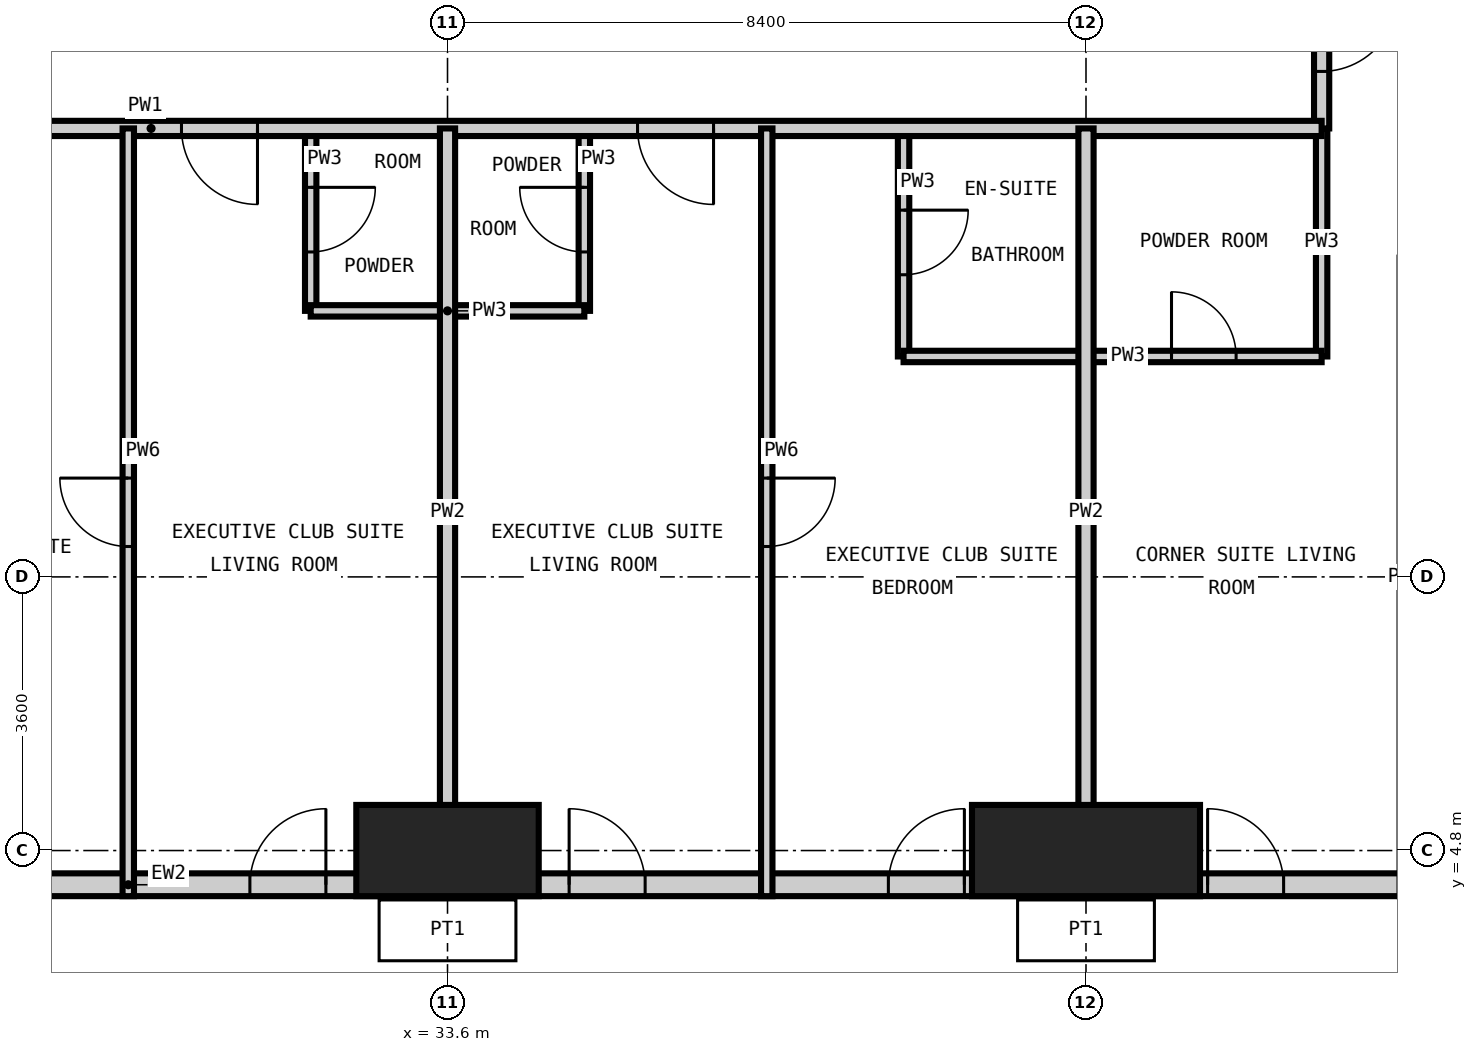
"""IFC4 building model, lengths in metres.
Left out: names, types, materials, properties, quantities, classifications, styles, units other than length and angle.
Written with IfcOpenShell. Run it as: python <this file> out.ifc"""

import sys

from ifc_helpers import new_model, si_unit, direction, frame, frame_2d, origin, origin_2d, place, context, subcontext, project, spatial, rectangle, extrude, element, fill, save


model = new_model("IFC4")
c1 = context("Model", 3, precision=1e-05, world=origin(), true_north=direction((0.0, 1.0)))
c2 = subcontext(c1, "Body", "Model", "MODEL_VIEW")
j1 = project(units=[si_unit("LENGTHUNIT", "METRE"), si_unit("PLANEANGLEUNIT", "RADIAN")], contexts=[c1])
p1 = place(None, origin())
s1 = spatial("IfcSite", under=j1, at=p1, CompositionType="ELEMENT")
p2 = place(p1, origin())
s2 = spatial("IfcBuilding", under=s1, at=p2, CompositionType="ELEMENT")
p3 = place(p2, frame((0.0, 0.0, 159.0)))
s3 = spatial("IfcBuildingStorey", under=s2, at=p3, CompositionType="ELEMENT", Elevation=159.0)
p4 = place(p3, frame((33.6, 4.8, -0.35), z_axis=(0.0, 0.0, 1.0), x_axis=(1.0, 0.0, 0.0)))
e1 = element("IfcColumn", 1, at=p4, inside=s3, PredefinedType="COLUMN", context=c2, shape_type="SweptSolid", body=[
    extrude(rectangle(XDim=2.4, YDim=1.2, at=origin_2d()), origin(), (0.0, 0.0, 1.0), 3.6),
])
p5 = place(p3, frame((42.0, 4.8, -0.35), z_axis=(0.0, 0.0, 1.0), x_axis=(1.0, 0.0, 0.0)))
e2 = element("IfcColumn", 2, at=p5, inside=s3, PredefinedType="COLUMN", context=c2, shape_type="SweptSolid", body=[
    extrude(rectangle(XDim=3.0, YDim=1.2, at=origin_2d()), origin(), (0.0, 0.0, 1.0), 3.6),
])
p6 = place(p3, frame((6.9, 4.35, 0.0), z_axis=(0.0, 0.0, 1.0), x_axis=(1.0, 0.0, 0.0)))
e3 = element("IfcWall", 3, at=p6, inside=s3, PredefinedType="SOLIDWALL", context=c2, shape_type="SweptSolid", body=[
    extrude(rectangle(XDim=45.0, YDim=0.3, at=frame_2d((22.5, 0.0))), origin(), (0.0, 0.0, 1.0), 3.25),
])
p7 = place(p6, frame((2.75, 0.0, 0.0)))
e4 = element("IfcOpeningElement", 4, at=p7, cuts=e3, PredefinedType="OPENING", context=c2, shape_type="SweptSolid", body=[
    extrude(rectangle(XDim=1.0, YDim=2.4, at=frame_2d((0.5, 1.2))), frame((0.0, 0.16, 0.0), z_axis=(0.0, -1.0, 0.0), x_axis=(1.0, 0.0, 0.0)), (0.0, 0.0, 1.0), 0.32),
])
p8 = place(p6, frame((7.3, 0.0, 0.0)))
e5 = element("IfcOpeningElement", 5, at=p8, cuts=e3, PredefinedType="OPENING", context=c2, shape_type="SweptSolid", body=[
    extrude(rectangle(XDim=1.0, YDim=2.4, at=frame_2d((0.5, 1.2))), frame((0.0, 0.16, 0.0), z_axis=(0.0, -1.0, 0.0), x_axis=(1.0, 0.0, 0.0)), (0.0, 0.0, 1.0), 0.32),
])
p9 = place(p6, frame((11.5, 0.0, 0.0)))
e6 = element("IfcOpeningElement", 6, at=p9, cuts=e3, PredefinedType="OPENING", context=c2, shape_type="SweptSolid", body=[
    extrude(rectangle(XDim=1.0, YDim=2.4, at=frame_2d((0.5, 1.2))), frame((0.0, 0.16, 0.0), z_axis=(0.0, -1.0, 0.0), x_axis=(1.0, 0.0, 0.0)), (0.0, 0.0, 1.0), 0.32),
])
p10 = place(p6, frame((15.7, 0.0, 0.0)))
e7 = element("IfcOpeningElement", 7, at=p10, cuts=e3, PredefinedType="OPENING", context=c2, shape_type="SweptSolid", body=[
    extrude(rectangle(XDim=1.0, YDim=2.4, at=frame_2d((0.5, 1.2))), frame((0.0, 0.16, 0.0), z_axis=(0.0, -1.0, 0.0), x_axis=(1.0, 0.0, 0.0)), (0.0, 0.0, 1.0), 0.32),
])
p11 = place(p6, frame((19.9, 0.0, 0.0)))
e8 = element("IfcOpeningElement", 8, at=p11, cuts=e3, PredefinedType="OPENING", context=c2, shape_type="SweptSolid", body=[
    extrude(rectangle(XDim=1.0, YDim=2.4, at=frame_2d((0.5, 1.2))), frame((0.0, 0.16, 0.0), z_axis=(0.0, -1.0, 0.0), x_axis=(1.0, 0.0, 0.0)), (0.0, 0.0, 1.0), 0.32),
])
p12 = place(p6, frame((24.1, 0.0, 0.0)))
e9 = element("IfcOpeningElement", 9, at=p12, cuts=e3, PredefinedType="OPENING", context=c2, shape_type="SweptSolid", body=[
    extrude(rectangle(XDim=1.0, YDim=2.4, at=frame_2d((0.5, 1.2))), frame((0.0, 0.16, 0.0), z_axis=(0.0, -1.0, 0.0), x_axis=(1.0, 0.0, 0.0)), (0.0, 0.0, 1.0), 0.32),
])
p13 = place(p6, frame((28.3, 0.0, 0.0)))
e10 = element("IfcOpeningElement", 10, at=p13, cuts=e3, PredefinedType="OPENING", context=c2, shape_type="SweptSolid", body=[
    extrude(rectangle(XDim=1.0, YDim=2.4, at=frame_2d((0.5, 1.2))), frame((0.0, 0.16, 0.0), z_axis=(0.0, -1.0, 0.0), x_axis=(1.0, 0.0, 0.0)), (0.0, 0.0, 1.0), 0.32),
])
p14 = place(p6, frame((32.5, 0.0, 0.0)))
e11 = element("IfcOpeningElement", 11, at=p14, cuts=e3, PredefinedType="OPENING", context=c2, shape_type="SweptSolid", body=[
    extrude(rectangle(XDim=1.0, YDim=2.4, at=frame_2d((0.5, 1.2))), frame((0.0, 0.16, 0.0), z_axis=(0.0, -1.0, 0.0), x_axis=(1.0, 0.0, 0.0)), (0.0, 0.0, 1.0), 0.32),
])
p15 = place(p6, frame((36.7, 0.0, 0.0)))
e12 = element("IfcOpeningElement", 12, at=p15, cuts=e3, PredefinedType="OPENING", context=c2, shape_type="SweptSolid", body=[
    extrude(rectangle(XDim=1.0, YDim=2.4, at=frame_2d((0.5, 1.2))), frame((0.0, 0.16, 0.0), z_axis=(0.0, -1.0, 0.0), x_axis=(1.0, 0.0, 0.0)), (0.0, 0.0, 1.0), 0.32),
])
p16 = place(p6, frame((41.25, 0.0, 0.0)))
e13 = element("IfcOpeningElement", 13, at=p16, cuts=e3, PredefinedType="OPENING", context=c2, shape_type="SweptSolid", body=[
    extrude(rectangle(XDim=1.0, YDim=2.4, at=frame_2d((0.5, 1.2))), frame((0.0, 0.16, 0.0), z_axis=(0.0, -1.0, 0.0), x_axis=(1.0, 0.0, 0.0)), (0.0, 0.0, 1.0), 0.32),
])
p17 = place(p3, frame((31.8, 11.9, 0.0), z_axis=(0.0, 0.0, 1.0), x_axis=(0.0, 1.0, 0.0)))
e14 = element("IfcWall", 14, at=p17, inside=s3, PredefinedType="PARTITIONING", context=c2, shape_type="SweptSolid", body=[
    extrude(rectangle(XDim=2.4, YDim=0.15, at=frame_2d((1.2, 0.0))), origin(), (0.0, 0.0, 1.0), 3.25),
])
p18 = place(p17, frame((0.775, 0.0, 0.0)))
e15 = element("IfcOpeningElement", 15, at=p18, cuts=e14, PredefinedType="OPENING", context=c2, shape_type="SweptSolid", body=[
    extrude(rectangle(XDim=0.85, YDim=2.1, at=frame_2d((0.425, 1.05))), frame((0.0, 0.085, 0.0), z_axis=(0.0, -1.0, 0.0), x_axis=(1.0, 0.0, 0.0)), (0.0, 0.0, 1.0), 0.17),
])
p19 = place(p3, frame((35.4, 11.9, 0.0), z_axis=(0.0, 0.0, 1.0), x_axis=(0.0, 1.0, 0.0)))
e16 = element("IfcWall", 16, at=p19, inside=s3, PredefinedType="PARTITIONING", context=c2, shape_type="SweptSolid", body=[
    extrude(rectangle(XDim=2.4, YDim=0.15, at=frame_2d((1.2, 0.0))), origin(), (0.0, 0.0, 1.0), 3.25),
])
p20 = place(p19, frame((0.775, 0.0, 0.0)))
e17 = element("IfcOpeningElement", 17, at=p20, cuts=e16, PredefinedType="OPENING", context=c2, shape_type="SweptSolid", body=[
    extrude(rectangle(XDim=0.85, YDim=2.1, at=frame_2d((0.425, 1.05))), frame((0.0, 0.085, 0.0), z_axis=(0.0, -1.0, 0.0), x_axis=(1.0, 0.0, 0.0)), (0.0, 0.0, 1.0), 0.17),
])
p21 = place(p3, frame((39.6, 11.3, 0.0), z_axis=(0.0, 0.0, 1.0), x_axis=(0.0, 1.0, 0.0)))
e18 = element("IfcWall", 18, at=p21, inside=s3, PredefinedType="PARTITIONING", context=c2, shape_type="SweptSolid", body=[
    extrude(rectangle(XDim=3.0, YDim=0.15, at=frame_2d((1.5, 0.0))), origin(), (0.0, 0.0, 1.0), 3.25),
])
p22 = place(p21, frame((1.075, 0.0, 0.0)))
e19 = element("IfcOpeningElement", 19, at=p22, cuts=e18, PredefinedType="OPENING", context=c2, shape_type="SweptSolid", body=[
    extrude(rectangle(XDim=0.85, YDim=2.1, at=frame_2d((0.425, 1.05))), frame((0.0, 0.085, 0.0), z_axis=(0.0, -1.0, 0.0), x_axis=(1.0, 0.0, 0.0)), (0.0, 0.0, 1.0), 0.17),
])
p23 = place(p3, frame((45.1, 11.3, 0.0), z_axis=(0.0, 0.0, 1.0), x_axis=(0.0, 1.0, 0.0)))
e20 = element("IfcWall", 20, at=p23, inside=s3, PredefinedType="PARTITIONING", context=c2, shape_type="SweptSolid", body=[
    extrude(rectangle(XDim=3.0, YDim=0.15, at=frame_2d((1.5, 0.0))), origin(), (0.0, 0.0, 1.0), 3.25),
])
p24 = place(p3, frame((39.6, 11.3, 0.0), z_axis=(0.0, 0.0, 1.0), x_axis=(1.0, 0.0, 0.0)))
e21 = element("IfcWall", 21, at=p24, inside=s3, PredefinedType="PARTITIONING", context=c2, shape_type="SweptSolid", body=[
    extrude(rectangle(XDim=5.5, YDim=0.15, at=frame_2d((2.75, 0.0))), origin(), (0.0, 0.0, 1.0), 3.25),
])
p25 = place(p24, frame((3.525, 0.0, 0.0)))
e22 = element("IfcOpeningElement", 22, at=p25, cuts=e21, PredefinedType="OPENING", context=c2, shape_type="SweptSolid", body=[
    extrude(rectangle(XDim=0.85, YDim=2.1, at=frame_2d((0.425, 1.05))), frame((0.0, 0.085, 0.0), z_axis=(0.0, -1.0, 0.0), x_axis=(1.0, 0.0, 0.0)), (0.0, 0.0, 1.0), 0.17),
])
p26 = place(p3, frame((31.8, 11.9, 0.0), z_axis=(0.0, 0.0, 1.0), x_axis=(1.0, 0.0, 0.0)))
e23 = element("IfcWall", 23, at=p26, inside=s3, PredefinedType="PARTITIONING", context=c2, shape_type="SweptSolid", body=[
    extrude(rectangle(XDim=3.6, YDim=0.15, at=frame_2d((1.8, 0.0))), origin(), (0.0, 0.0, 1.0), 3.25),
])
p27 = place(p3, frame((45.1, 45.7, 0.0), z_axis=(0.0, 0.0, 1.0), x_axis=(0.0, -1.0, 0.0)))
e24 = element("IfcWall", 24, at=p27, inside=s3, PredefinedType="PARTITIONING", context=c2, shape_type="SweptSolid", body=[
    extrude(rectangle(XDim=31.4, YDim=0.2, at=frame_2d((15.7, 0.0))), origin(), (0.0, 0.0, 1.0), 3.25),
])
p28 = place(p27, frame((25.1, 0.0, 0.0)))
e25 = element("IfcOpeningElement", 25, at=p28, cuts=e24, PredefinedType="OPENING", context=c2, shape_type="SweptSolid", body=[
    extrude(rectangle(XDim=1.0, YDim=2.2, at=frame_2d((0.5, 1.1))), frame((0.0, 0.11, 0.0), z_axis=(0.0, -1.0, 0.0), x_axis=(1.0, 0.0, 0.0)), (0.0, 0.0, 1.0), 0.22),
])
p29 = place(p27, frame((23.3, 0.0, 0.0)))
e26 = element("IfcOpeningElement", 26, at=p29, cuts=e24, PredefinedType="OPENING", context=c2, shape_type="SweptSolid", body=[
    extrude(rectangle(XDim=1.0, YDim=2.2, at=frame_2d((0.5, 1.1))), frame((0.0, 0.11, 0.0), z_axis=(0.0, -1.0, 0.0), x_axis=(1.0, 0.0, 0.0)), (0.0, 0.0, 1.0), 0.22),
])
p30 = place(p27, frame((16.7, 0.0, 0.0)))
e27 = element("IfcOpeningElement", 27, at=p30, cuts=e24, PredefinedType="OPENING", context=c2, shape_type="SweptSolid", body=[
    extrude(rectangle(XDim=1.0, YDim=2.2, at=frame_2d((0.5, 1.1))), frame((0.0, 0.11, 0.0), z_axis=(0.0, -1.0, 0.0), x_axis=(1.0, 0.0, 0.0)), (0.0, 0.0, 1.0), 0.22),
])
p31 = place(p27, frame((14.9, 0.0, 0.0)))
e28 = element("IfcOpeningElement", 28, at=p31, cuts=e24, PredefinedType="OPENING", context=c2, shape_type="SweptSolid", body=[
    extrude(rectangle(XDim=1.0, YDim=2.2, at=frame_2d((0.5, 1.1))), frame((0.0, 0.11, 0.0), z_axis=(0.0, -1.0, 0.0), x_axis=(1.0, 0.0, 0.0)), (0.0, 0.0, 1.0), 0.22),
])
p32 = place(p27, frame((8.3, 0.0, 0.0)))
e29 = element("IfcOpeningElement", 29, at=p32, cuts=e24, PredefinedType="OPENING", context=c2, shape_type="SweptSolid", body=[
    extrude(rectangle(XDim=1.0, YDim=2.2, at=frame_2d((0.5, 1.1))), frame((0.0, 0.11, 0.0), z_axis=(0.0, -1.0, 0.0), x_axis=(1.0, 0.0, 0.0)), (0.0, 0.0, 1.0), 0.22),
])
p33 = place(p27, frame((6.5, 0.0, 0.0)))
e30 = element("IfcOpeningElement", 30, at=p33, cuts=e24, PredefinedType="OPENING", context=c2, shape_type="SweptSolid", body=[
    extrude(rectangle(XDim=1.0, YDim=2.2, at=frame_2d((0.5, 1.1))), frame((0.0, 0.11, 0.0), z_axis=(0.0, -1.0, 0.0), x_axis=(1.0, 0.0, 0.0)), (0.0, 0.0, 1.0), 0.22),
])
p34 = place(p27, frame((29.65, 0.0, 0.0)))
e31 = element("IfcOpeningElement", 31, at=p34, cuts=e24, PredefinedType="OPENING", context=c2, shape_type="SweptSolid", body=[
    extrude(rectangle(XDim=1.0, YDim=2.2, at=frame_2d((0.5, 1.1))), frame((0.0, 0.11, 0.0), z_axis=(0.0, -1.0, 0.0), x_axis=(1.0, 0.0, 0.0)), (0.0, 0.0, 1.0), 0.22),
])
p35 = place(p27, frame((1.35, 0.0, 0.0)))
e32 = element("IfcOpeningElement", 32, at=p35, cuts=e24, PredefinedType="OPENING", context=c2, shape_type="SweptSolid", body=[
    extrude(rectangle(XDim=1.0, YDim=2.2, at=frame_2d((0.5, 1.1))), frame((0.0, 0.11, 0.0), z_axis=(0.0, -1.0, 0.0), x_axis=(1.0, 0.0, 0.0)), (0.0, 0.0, 1.0), 0.22),
])
p36 = place(p3, frame((45.1, 14.3, 0.0), z_axis=(0.0, 0.0, 1.0), x_axis=(-1.0, 0.0, 0.0)))
e33 = element("IfcWall", 33, at=p36, inside=s3, PredefinedType="PARTITIONING", context=c2, shape_type="SweptSolid", body=[
    extrude(rectangle(XDim=30.8, YDim=0.2, at=frame_2d((15.4, 0.0))), origin(), (0.0, 0.0, 1.0), 3.25),
])
p37 = place(p36, frame((24.8, 0.0, 0.0)))
e34 = element("IfcOpeningElement", 34, at=p37, cuts=e33, PredefinedType="OPENING", context=c2, shape_type="SweptSolid", body=[
    extrude(rectangle(XDim=1.0, YDim=2.2, at=frame_2d((0.5, 1.1))), frame((0.0, 0.11, 0.0), z_axis=(0.0, -1.0, 0.0), x_axis=(1.0, 0.0, 0.0)), (0.0, 0.0, 1.0), 0.22),
])
p38 = place(p36, frame((14.0, 0.0, 0.0)))
e35 = element("IfcOpeningElement", 35, at=p38, cuts=e33, PredefinedType="OPENING", context=c2, shape_type="SweptSolid", body=[
    extrude(rectangle(XDim=1.0, YDim=2.2, at=frame_2d((0.5, 1.1))), frame((0.0, 0.11, 0.0), z_axis=(0.0, -1.0, 0.0), x_axis=(1.0, 0.0, 0.0)), (0.0, 0.0, 1.0), 0.22),
])
p39 = place(p36, frame((8.0, 0.0, 0.0)))
e36 = element("IfcOpeningElement", 36, at=p39, cuts=e33, PredefinedType="OPENING", context=c2, shape_type="SweptSolid", body=[
    extrude(rectangle(XDim=1.0, YDim=2.2, at=frame_2d((0.5, 1.1))), frame((0.0, 0.11, 0.0), z_axis=(0.0, -1.0, 0.0), x_axis=(1.0, 0.0, 0.0)), (0.0, 0.0, 1.0), 0.22),
])
for number, where, z_axis, x_axis in (
    (37, (33.6, 4.2, 0.0), (0.0, 0.0, 1.0), (0.0, 1.0, 0.0)),
    (38, (42.0, 4.2, 0.0), (0.0, 0.0, 1.0), (0.0, 1.0, 0.0)),
):
    element("IfcWall", number, at=place(p3, frame(where, z_axis=z_axis, x_axis=x_axis)), inside=s3, PredefinedType="PARTITIONING", context=c2, shape_type="SweptSolid", body=[
        extrude(rectangle(XDim=10.1, YDim=0.2, at=frame_2d((5.05, 0.0))), origin(), (0.0, 0.0, 1.0), 3.25),
    ])
p40 = place(p3, frame((29.4, 4.2, 0.0), z_axis=(0.0, 0.0, 1.0), x_axis=(0.0, 1.0, 0.0)))
e39 = element("IfcWall", 39, at=p40, inside=s3, PredefinedType="PARTITIONING", context=c2, shape_type="SweptSolid", body=[
    extrude(rectangle(XDim=10.1, YDim=0.15, at=frame_2d((5.05, 0.0))), origin(), (0.0, 0.0, 1.0), 3.25),
])
p41 = place(p40, frame((4.6, 0.0, 0.0)))
e40 = element("IfcOpeningElement", 40, at=p41, cuts=e39, PredefinedType="OPENING", context=c2, shape_type="SweptSolid", body=[
    extrude(rectangle(XDim=0.9, YDim=2.1, at=frame_2d((0.45, 1.05))), frame((0.0, 0.085, 0.0), z_axis=(0.0, -1.0, 0.0), x_axis=(1.0, 0.0, 0.0)), (0.0, 0.0, 1.0), 0.17),
])
p42 = place(p3, frame((37.8, 4.2, 0.0), z_axis=(0.0, 0.0, 1.0), x_axis=(0.0, 1.0, 0.0)))
e41 = element("IfcWall", 41, at=p42, inside=s3, PredefinedType="PARTITIONING", context=c2, shape_type="SweptSolid", body=[
    extrude(rectangle(XDim=10.1, YDim=0.15, at=frame_2d((5.05, 0.0))), origin(), (0.0, 0.0, 1.0), 3.25),
])
p43 = place(p42, frame((4.6, 0.0, 0.0)))
e42 = element("IfcOpeningElement", 42, at=p43, cuts=e41, PredefinedType="OPENING", context=c2, shape_type="SweptSolid", body=[
    extrude(rectangle(XDim=0.9, YDim=2.1, at=frame_2d((0.45, 1.05))), frame((0.0, 0.085, 0.0), z_axis=(0.0, -1.0, 0.0), x_axis=(1.0, 0.0, 0.0)), (0.0, 0.0, 1.0), 0.17),
])
p44 = place(p12, origin())
e43 = element("IfcDoor", 43, at=p44, inside=s3, OperationType="SINGLE_SWING_RIGHT", PredefinedType="DOOR", context=c2, shape_type="SweptSolid", body=[
    extrude(rectangle(XDim=1.0, YDim=2.4, at=frame_2d((0.5, 1.2))), frame((0.0, 0.025, 0.0), z_axis=(0.0, -1.0, 0.0), x_axis=(1.0, 0.0, 0.0)), (0.0, 0.0, 1.0), 0.05),
])
fill(e9, e43)
p45 = place(p13, origin())
e44 = element("IfcDoor", 44, at=p45, inside=s3, OperationType="SINGLE_SWING_LEFT", PredefinedType="DOOR", context=c2, shape_type="SweptSolid", body=[
    extrude(rectangle(XDim=1.0, YDim=2.4, at=frame_2d((0.5, 1.2))), frame((0.0, 0.025, 0.0), z_axis=(0.0, -1.0, 0.0), x_axis=(1.0, 0.0, 0.0)), (0.0, 0.0, 1.0), 0.05),
])
fill(e10, e44)
p46 = place(p14, origin())
e45 = element("IfcDoor", 45, at=p46, inside=s3, OperationType="SINGLE_SWING_RIGHT", PredefinedType="DOOR", context=c2, shape_type="SweptSolid", body=[
    extrude(rectangle(XDim=1.0, YDim=2.4, at=frame_2d((0.5, 1.2))), frame((0.0, 0.025, 0.0), z_axis=(0.0, -1.0, 0.0), x_axis=(1.0, 0.0, 0.0)), (0.0, 0.0, 1.0), 0.05),
])
fill(e11, e45)
p47 = place(p15, origin())
e46 = element("IfcDoor", 46, at=p47, inside=s3, OperationType="SINGLE_SWING_LEFT", PredefinedType="DOOR", context=c2, shape_type="SweptSolid", body=[
    extrude(rectangle(XDim=1.0, YDim=2.4, at=frame_2d((0.5, 1.2))), frame((0.0, 0.025, 0.0), z_axis=(0.0, -1.0, 0.0), x_axis=(1.0, 0.0, 0.0)), (0.0, 0.0, 1.0), 0.05),
])
fill(e12, e46)
p48 = place(p38, origin())
e47 = element("IfcDoor", 47, at=p48, inside=s3, OperationType="SINGLE_SWING_LEFT", PredefinedType="DOOR", context=c2, shape_type="SweptSolid", body=[
    extrude(rectangle(XDim=1.0, YDim=2.2, at=frame_2d((0.5, 1.1))), frame((0.0, 0.025, 0.0), z_axis=(0.0, -1.0, 0.0), x_axis=(1.0, 0.0, 0.0)), (0.0, 0.0, 1.0), 0.05),
])
fill(e35, e47)
p49 = place(p18, frame((0.85, 0.0, 0.0), z_axis=(0.0, 0.0, 1.0), x_axis=(-1.0, 0.0, 0.0)))
e48 = element("IfcDoor", 48, at=p49, inside=s3, OperationType="SINGLE_SWING_LEFT", PredefinedType="DOOR", context=c2, shape_type="SweptSolid", body=[
    extrude(rectangle(XDim=0.85, YDim=2.1, at=frame_2d((0.425, 1.05))), frame((0.0, 0.025, 0.0), z_axis=(0.0, -1.0, 0.0), x_axis=(1.0, 0.0, 0.0)), (0.0, 0.0, 1.0), 0.05),
])
fill(e15, e48)
p50 = place(p41, origin())
e49 = element("IfcDoor", 49, at=p50, inside=s3, OperationType="SINGLE_SWING_RIGHT", PredefinedType="DOOR", context=c2, shape_type="SweptSolid", body=[
    extrude(rectangle(XDim=0.9, YDim=2.1, at=frame_2d((0.45, 1.05))), frame((0.0, 0.025, 0.0), z_axis=(0.0, -1.0, 0.0), x_axis=(1.0, 0.0, 0.0)), (0.0, 0.0, 1.0), 0.05),
])
fill(e40, e49)
p51 = place(p39, origin())
e50 = element("IfcDoor", 50, at=p51, inside=s3, OperationType="SINGLE_SWING_LEFT", PredefinedType="DOOR", context=c2, shape_type="SweptSolid", body=[
    extrude(rectangle(XDim=1.0, YDim=2.2, at=frame_2d((0.5, 1.1))), frame((0.0, 0.025, 0.0), z_axis=(0.0, -1.0, 0.0), x_axis=(1.0, 0.0, 0.0)), (0.0, 0.0, 1.0), 0.05),
])
fill(e36, e50)
p52 = place(p20, origin())
e51 = element("IfcDoor", 51, at=p52, inside=s3, OperationType="SINGLE_SWING_RIGHT", PredefinedType="DOOR", context=c2, shape_type="SweptSolid", body=[
    extrude(rectangle(XDim=0.85, YDim=2.1, at=frame_2d((0.425, 1.05))), frame((0.0, 0.025, 0.0), z_axis=(0.0, -1.0, 0.0), x_axis=(1.0, 0.0, 0.0)), (0.0, 0.0, 1.0), 0.05),
])
fill(e17, e51)
p53 = place(p43, frame((0.9, 0.0, 0.0), z_axis=(0.0, 0.0, 1.0), x_axis=(-1.0, 0.0, 0.0)))
e52 = element("IfcDoor", 52, at=p53, inside=s3, OperationType="SINGLE_SWING_LEFT", PredefinedType="DOOR", context=c2, shape_type="SweptSolid", body=[
    extrude(rectangle(XDim=0.9, YDim=2.1, at=frame_2d((0.45, 1.05))), frame((0.0, 0.025, 0.0), z_axis=(0.0, -1.0, 0.0), x_axis=(1.0, 0.0, 0.0)), (0.0, 0.0, 1.0), 0.05),
])
fill(e42, e52)
p54 = place(p22, frame((0.85, 0.0, 0.0), z_axis=(0.0, 0.0, 1.0), x_axis=(-1.0, 0.0, 0.0)))
e53 = element("IfcDoor", 53, at=p54, inside=s3, OperationType="SINGLE_SWING_LEFT", PredefinedType="DOOR", context=c2, shape_type="SweptSolid", body=[
    extrude(rectangle(XDim=0.85, YDim=2.1, at=frame_2d((0.425, 1.05))), frame((0.0, 0.025, 0.0), z_axis=(0.0, -1.0, 0.0), x_axis=(1.0, 0.0, 0.0)), (0.0, 0.0, 1.0), 0.05),
])
fill(e19, e53)
p55 = place(p34, origin())
e54 = element("IfcDoor", 54, at=p55, inside=s3, OperationType="SINGLE_SWING_LEFT", PredefinedType="DOOR", context=c2, shape_type="SweptSolid", body=[
    extrude(rectangle(XDim=1.0, YDim=2.2, at=frame_2d((0.5, 1.1))), frame((0.0, 0.025, 0.0), z_axis=(0.0, -1.0, 0.0), x_axis=(1.0, 0.0, 0.0)), (0.0, 0.0, 1.0), 0.05),
])
fill(e31, e54)
p56 = place(p25, origin())
e55 = element("IfcDoor", 55, at=p56, inside=s3, OperationType="SINGLE_SWING_LEFT", PredefinedType="DOOR", context=c2, shape_type="SweptSolid", body=[
    extrude(rectangle(XDim=0.85, YDim=2.1, at=frame_2d((0.425, 1.05))), frame((0.0, 0.025, 0.0), z_axis=(0.0, -1.0, 0.0), x_axis=(1.0, 0.0, 0.0)), (0.0, 0.0, 1.0), 0.05),
])
fill(e22, e55)
save(model, sys.argv[1])
